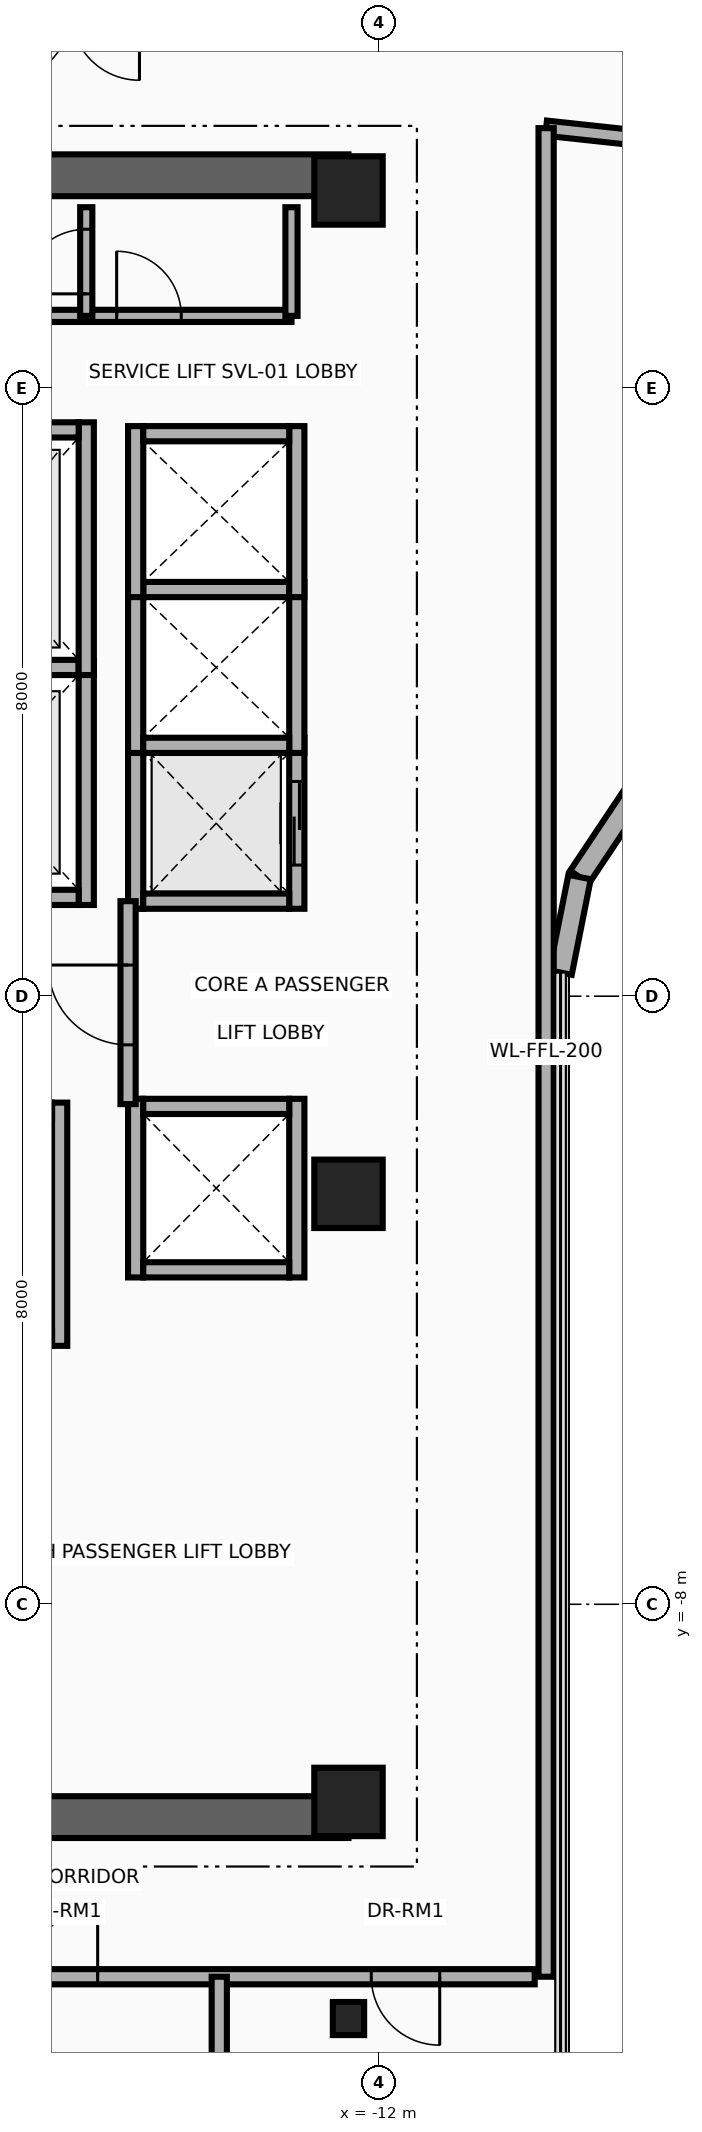
"""IFC4 building model, lengths in metres.
Left out: names, types, materials, properties, quantities, classifications, styles, units other than length and angle.
Written with IfcOpenShell. Run it as: python <this file> out.ifc"""

import sys

from ifc_helpers import new_model, si_unit, direction, frame, frame_2d, origin, origin_2d, place, context, subcontext, project, spatial, rectangle, i_section, extrude, source, transform, mapped, element, fill, save


model = new_model("IFC4")
c1 = context("Model", 3, precision=1e-05, world=origin(), true_north=direction((0.0, 1.0)))
c2 = subcontext(c1, "Body", "Model", "MODEL_VIEW")
j1 = project(units=[si_unit("LENGTHUNIT", "METRE"), si_unit("PLANEANGLEUNIT", "RADIAN")], contexts=[c1])
p1 = place(None, origin())
s1 = spatial("IfcSite", under=j1, at=p1, CompositionType="ELEMENT")
p2 = place(p1, origin())
s2 = spatial("IfcBuilding", under=s1, at=p2, CompositionType="ELEMENT")
p3 = place(p2, frame((0.0, 0.0, 196.3)))
s3 = spatial("IfcBuildingStorey", under=s2, at=p3, CompositionType="ELEMENT", Elevation=196.3)
for number, where, z_axis, x_axis in (
    (1, (-22.65, 10.8, 0.0), (0.0, 0.0, 1.0), (1.0, 0.0, 0.0)),
    (2, (-22.65, -10.8, 0.0), (0.0, 0.0, 1.0), (1.0, 0.0, 0.0)),
):
    element("IfcWall", number, at=place(p3, frame(where, z_axis=z_axis, x_axis=x_axis)), inside=s3, PredefinedType="SHEAR", context=c2, shape_type="SweptSolid", body=[
        extrude(rectangle(XDim=10.25, YDim=0.55, at=frame_2d((5.125, 0.0))), origin(), (0.0, 0.0, 1.0), 4.46),
    ])
m1 = source(origin(), c2, "Body", "SweptSolid", [
    extrude(rectangle(XDim=0.9, YDim=0.9, at=origin_2d()), origin(), (0.0, 0.0, 1.0), 4.7),
])
for number, where, z_axis, x_axis in (
    (3, (-12.4, -10.6, 0.0), (0.0, 0.0, 1.0), (1.0, 0.0, 0.0)),
    (4, (-12.4, -2.6, 0.0), (0.0, 0.0, 1.0), (1.0, 0.0, 0.0)),
    (5, (-12.4, 10.6, 0.0), (0.0, 0.0, 1.0), (1.0, 0.0, 0.0)),
):
    element("IfcColumn", number, at=place(p3, frame(where, z_axis=z_axis, x_axis=x_axis)), inside=s3, PredefinedType="COLUMN", context=c2, shape_type="MappedRepresentation", body=[
        mapped(m1, transform((0.0, 0.0, 0.0), x_axis=(1.0, 0.0, 0.0), y_axis=(0.0, 1.0, 0.0), z_axis=(0.0, 0.0, 1.0), scale=1.0)),
    ])
m2 = source(origin(), c2, "Body", "SweptSolid", [
    extrude(i_section(OverallWidth=0.412, OverallDepth=0.435, WebThickness=0.036, FlangeThickness=0.057, at=origin_2d()), origin(), (0.0, 0.0, 1.0), 4.7),
])
p4 = place(p3, frame((-12.4, -13.45, 0.0), z_axis=(0.0, 0.0, 1.0), x_axis=(1.0, 0.0, 0.0)))
e6 = element("IfcColumn", 6, at=p4, inside=s3, PredefinedType="COLUMN", context=c2, shape_type="MappedRepresentation", body=[
    mapped(m2, transform((0.0, 0.0, 0.0), x_axis=(1.0, 0.0, 0.0), y_axis=(0.0, 1.0, 0.0), z_axis=(0.0, 0.0, 1.0), scale=1.0)),
])
p5 = place(p3, frame((-8.642, 2.642, 0.0), z_axis=(0.0, 0.0, 1.0), x_axis=(-0.555528135371, -0.831497739511, 0.0)))
e7 = element("IfcWall", 7, at=p5, inside=s3, PredefinedType="SOLIDWALL", context=c2, shape_type="SweptSolid", body=[
    extrude(rectangle(XDim=1.292, YDim=0.3, at=frame_2d((0.646, 0.0))), origin(), (0.0, 0.0, 1.0), 4.46),
])
p6 = place(p3, frame((-9.36, 1.567, 0.0), z_axis=(0.0, 0.0, 1.0), x_axis=(-0.195126623715, -0.980778058848, 0.0)))
e8 = element("IfcWall", 8, at=p6, inside=s3, PredefinedType="SOLIDWALL", context=c2, shape_type="SweptSolid", body=[
    extrude(rectangle(XDim=1.281, YDim=0.3, at=frame_2d((0.641, 0.0))), origin(), (0.0, 0.0, 1.0), 4.46),
])
p7 = place(p3, frame((-15.85, 1.2, 0.0), z_axis=(0.0, 0.0, 1.0), x_axis=(0.0, 1.0, 0.0)))
e9 = element("IfcWall", 9, at=p7, inside=s3, PredefinedType="MOVABLE", context=c2, shape_type="SweptSolid", body=[
    extrude(rectangle(XDim=3.225, YDim=0.2, at=frame_2d((1.613, 0.0))), origin(), (0.0, 0.0, 1.0), 4.46),
])
p8 = place(p3, frame((-18.55, 1.3, 0.0), z_axis=(0.0, 0.0, 1.0), x_axis=(1.0, 0.0, 0.0)))
e10 = element("IfcWall", 10, at=p8, inside=s3, PredefinedType="MOVABLE", context=c2, shape_type="SweptSolid", body=[
    extrude(rectangle(XDim=2.6, YDim=0.2, at=frame_2d((1.3, 0.0))), origin(), (0.0, 0.0, 1.0), 4.46),
])
p9 = place(p8, frame((0.7, 0.0, 0.0)))
e11 = element("IfcOpeningElement", 11, at=p9, cuts=e10, PredefinedType="OPENING", context=c2, shape_type="SweptSolid", body=[
    extrude(rectangle(XDim=1.2, YDim=2.1, at=frame_2d((0.6, 1.05))), frame((0.0, 0.115, 0.0), z_axis=(0.0, -1.0, 0.0), x_axis=(1.0, 0.0, 0.0)), (0.0, 0.0, 1.0), 0.23),
])
p10 = place(p3, frame((-18.55, 4.325, 0.0), z_axis=(0.0, 0.0, 1.0), x_axis=(1.0, 0.0, 0.0)))
e12 = element("IfcWall", 12, at=p10, inside=s3, PredefinedType="MOVABLE", context=c2, shape_type="SweptSolid", body=[
    extrude(rectangle(XDim=2.6, YDim=0.2, at=frame_2d((1.3, 0.0))), origin(), (0.0, 0.0, 1.0), 4.46),
])
p11 = place(p3, frame((-16.2, -4.6, 0.0), z_axis=(0.0, 0.0, 1.0), x_axis=(0.0, 1.0, 0.0)))
e13 = element("IfcWall", 13, at=p11, inside=s3, PredefinedType="MOVABLE", context=c2, shape_type="SweptSolid", body=[
    extrude(rectangle(XDim=3.2, YDim=0.2, at=frame_2d((1.6, 0.0))), origin(), (0.0, 0.0, 1.0), 4.46),
])
p12 = place(p3, frame((-15.85, 4.225, 0.0), z_axis=(0.0, 0.0, 1.0), x_axis=(0.0, 1.0, 0.0)))
e14 = element("IfcWall", 14, at=p12, inside=s3, PredefinedType="MOVABLE", context=c2, shape_type="SweptSolid", body=[
    extrude(rectangle(XDim=3.325, YDim=0.2, at=frame_2d((1.663, 0.0))), origin(), (0.0, 0.0, 1.0), 4.46),
])
p13 = place(p3, frame((-18.55, 7.45, 0.0), z_axis=(0.0, 0.0, 1.0), x_axis=(1.0, 0.0, 0.0)))
e15 = element("IfcWall", 15, at=p13, inside=s3, PredefinedType="MOVABLE", context=c2, shape_type="SweptSolid", body=[
    extrude(rectangle(XDim=2.6, YDim=0.2, at=frame_2d((1.3, 0.0))), origin(), (0.0, 0.0, 1.0), 4.46),
])
p14 = place(p13, frame((0.7, 0.0, 0.0)))
e16 = element("IfcOpeningElement", 16, at=p14, cuts=e15, PredefinedType="OPENING", context=c2, shape_type="SweptSolid", body=[
    extrude(rectangle(XDim=1.2, YDim=2.1, at=frame_2d((0.6, 1.05))), frame((0.0, 0.115, 0.0), z_axis=(0.0, -1.0, 0.0), x_axis=(1.0, 0.0, 0.0)), (0.0, 0.0, 1.0), 0.23),
])
p15 = place(p3, frame((-15.2, 1.15, 0.0), z_axis=(0.0, 0.0, 1.0), x_axis=(0.0, 1.0, 0.0)))
e17 = element("IfcWall", 17, at=p15, inside=s3, PredefinedType="MOVABLE", context=c2, shape_type="SweptSolid", body=[
    extrude(rectangle(XDim=2.25, YDim=0.2, at=frame_2d((1.125, 0.0))), origin(), (0.0, 0.0, 1.0), 4.46),
])
p16 = place(p3, frame((-13.08, 1.15, 0.0), z_axis=(0.0, 0.0, 1.0), x_axis=(0.0, 1.0, 0.0)))
e18 = element("IfcWall", 18, at=p16, inside=s3, PredefinedType="MOVABLE", context=c2, shape_type="SweptSolid", body=[
    extrude(rectangle(XDim=2.25, YDim=0.2, at=frame_2d((1.125, 0.0))), origin(), (0.0, 0.0, 1.0), 4.46),
])
p17 = place(p16, frame((0.575, 0.0, 0.0)))
e19 = element("IfcOpeningElement", 19, at=p17, cuts=e18, PredefinedType="OPENING", context=c2, shape_type="SweptSolid", body=[
    extrude(rectangle(XDim=1.1, YDim=2.1, at=frame_2d((0.55, 1.05))), frame((0.0, 0.115, 0.0), z_axis=(0.0, -1.0, 0.0), x_axis=(1.0, 0.0, 0.0)), (0.0, 0.0, 1.0), 0.23),
])
p18 = place(p3, frame((-15.1, 1.25, 0.0), z_axis=(0.0, 0.0, 1.0), x_axis=(1.0, 0.0, 0.0)))
e20 = element("IfcWall", 20, at=p18, inside=s3, PredefinedType="MOVABLE", context=c2, shape_type="SweptSolid", body=[
    extrude(rectangle(XDim=1.92, YDim=0.2, at=frame_2d((0.96, 0.0))), origin(), (0.0, 0.0, 1.0), 4.46),
])
for number, where, z_axis, x_axis in (
    (21, (-15.2, 3.2, 0.0), (0.0, 0.0, 1.0), (0.0, 1.0, 0.0)),
    (22, (-13.08, 3.2, 0.0), (0.0, 0.0, 1.0), (0.0, 1.0, 0.0)),
):
    element("IfcWall", number, at=place(p3, frame(where, z_axis=z_axis, x_axis=x_axis)), inside=s3, PredefinedType="MOVABLE", context=c2, shape_type="SweptSolid", body=[
        extrude(rectangle(XDim=2.25, YDim=0.2, at=frame_2d((1.125, 0.0))), origin(), (0.0, 0.0, 1.0), 4.46),
    ])
for number, where, z_axis, x_axis in (
    (23, (-15.1, 3.3, 0.0), (0.0, 0.0, 1.0), (1.0, 0.0, 0.0)),
    (24, (-15.1, 5.35, 0.0), (0.0, 0.0, 1.0), (1.0, 0.0, 0.0)),
):
    element("IfcWall", number, at=place(p3, frame(where, z_axis=z_axis, x_axis=x_axis)), inside=s3, PredefinedType="MOVABLE", context=c2, shape_type="SweptSolid", body=[
        extrude(rectangle(XDim=1.92, YDim=0.2, at=frame_2d((0.96, 0.0))), origin(), (0.0, 0.0, 1.0), 4.46),
    ])
for number, where, z_axis, x_axis in (
    (25, (-15.2, 5.25, 0.0), (0.0, 0.0, 1.0), (0.0, 1.0, 0.0)),
    (26, (-13.08, 5.25, 0.0), (0.0, 0.0, 1.0), (0.0, 1.0, 0.0)),
):
    element("IfcWall", number, at=place(p3, frame(where, z_axis=z_axis, x_axis=x_axis)), inside=s3, PredefinedType="MOVABLE", context=c2, shape_type="SweptSolid", body=[
        extrude(rectangle(XDim=2.25, YDim=0.2, at=frame_2d((1.125, 0.0))), origin(), (0.0, 0.0, 1.0), 4.46),
    ])
p19 = place(p3, frame((-15.1, 7.4, 0.0), z_axis=(0.0, 0.0, 1.0), x_axis=(1.0, 0.0, 0.0)))
e27 = element("IfcWall", 27, at=p19, inside=s3, PredefinedType="MOVABLE", context=c2, shape_type="SweptSolid", body=[
    extrude(rectangle(XDim=1.92, YDim=0.2, at=frame_2d((0.96, 0.0))), origin(), (0.0, 0.0, 1.0), 4.46),
])
for number, where, z_axis, x_axis in (
    (28, (-15.2, -3.7, 0.0), (0.0, 0.0, 1.0), (0.0, 1.0, 0.0)),
    (29, (-13.08, -3.7, 0.0), (0.0, 0.0, 1.0), (0.0, 1.0, 0.0)),
):
    element("IfcWall", number, at=place(p3, frame(where, z_axis=z_axis, x_axis=x_axis)), inside=s3, PredefinedType="MOVABLE", context=c2, shape_type="SweptSolid", body=[
        extrude(rectangle(XDim=2.35, YDim=0.2, at=frame_2d((1.175, 0.0))), origin(), (0.0, 0.0, 1.0), 4.46),
    ])
for number, where, z_axis, x_axis in (
    (30, (-15.1, -3.6, 0.0), (0.0, 0.0, 1.0), (1.0, 0.0, 0.0)),
    (31, (-15.1, -1.45, 0.0), (0.0, 0.0, 1.0), (1.0, 0.0, 0.0)),
):
    element("IfcWall", number, at=place(p3, frame(where, z_axis=z_axis, x_axis=x_axis)), inside=s3, PredefinedType="MOVABLE", context=c2, shape_type="SweptSolid", body=[
        extrude(rectangle(XDim=1.92, YDim=0.2, at=frame_2d((0.96, 0.0))), origin(), (0.0, 0.0, 1.0), 4.46),
    ])
p20 = place(p3, frame((-15.3, -1.42, 0.0), z_axis=(0.0, 0.0, 1.0), x_axis=(0.0, 1.0, 0.0)))
e32 = element("IfcWall", 32, at=p20, inside=s3, PredefinedType="PARTITIONING", context=c2, shape_type="SweptSolid", body=[
    extrude(rectangle(XDim=2.67, YDim=0.2, at=frame_2d((1.335, 0.0))), origin(), (0.0, 0.0, 1.0), 4.46),
])
p21 = place(p20, frame((0.78, 0.0, 0.0)))
e33 = element("IfcOpeningElement", 33, at=p21, cuts=e32, PredefinedType="OPENING", context=c2, shape_type="SweptSolid", body=[
    extrude(rectangle(XDim=1.05, YDim=2.15, at=frame_2d((0.525, 1.075))), frame((0.0, 0.115, 0.0), z_axis=(0.0, -1.0, 0.0), x_axis=(1.0, 0.0, 0.0)), (0.0, 0.0, 1.0), 0.23),
])
p22 = place(p3, frame((-18.65, 8.95, 0.0), z_axis=(0.0, 0.0, 1.0), x_axis=(1.0, 0.0, 0.0)))
e34 = element("IfcWall", 34, at=p22, inside=s3, PredefinedType="PARTITIONING", context=c2, shape_type="SweptSolid", body=[
    extrude(rectangle(XDim=5.5, YDim=0.16, at=frame_2d((2.75, 0.0))), origin(), (0.0, 0.0, 1.0), 4.46),
])
p23 = place(p22, frame((0.3, 0.0, 0.0)))
e35 = element("IfcOpeningElement", 35, at=p23, cuts=e34, PredefinedType="OPENING", context=c2, shape_type="SweptSolid", body=[
    extrude(rectangle(XDim=0.85, YDim=2.05, at=frame_2d((0.425, 1.025))), frame((0.0, 0.095, 0.0), z_axis=(0.0, -1.0, 0.0), x_axis=(1.0, 0.0, 0.0)), (0.0, 0.0, 1.0), 0.19),
])
p24 = place(p22, frame((3.2, 0.0, 0.0)))
e36 = element("IfcOpeningElement", 36, at=p24, cuts=e34, PredefinedType="OPENING", context=c2, shape_type="SweptSolid", body=[
    extrude(rectangle(XDim=0.85, YDim=2.05, at=frame_2d((0.425, 1.025))), frame((0.0, 0.095, 0.0), z_axis=(0.0, -1.0, 0.0), x_axis=(1.0, 0.0, 0.0)), (0.0, 0.0, 1.0), 0.19),
])
p25 = place(p3, frame((-13.15, 8.95, 0.0), z_axis=(0.0, 0.0, 1.0), x_axis=(0.0, 1.0, 0.0)))
e37 = element("IfcWall", 37, at=p25, inside=s3, PredefinedType="PARTITIONING", context=c2, shape_type="SweptSolid", body=[
    extrude(rectangle(XDim=1.43, YDim=0.16, at=frame_2d((0.715, 0.0))), origin(), (0.0, 0.0, 1.0), 4.46),
])
p26 = place(p3, frame((-15.85, 8.95, 0.0), z_axis=(0.0, 0.0, 1.0), x_axis=(0.0, 1.0, 0.0)))
e38 = element("IfcWall", 38, at=p26, inside=s3, PredefinedType="PARTITIONING", context=c2, shape_type="SweptSolid", body=[
    extrude(rectangle(XDim=1.43, YDim=0.16, at=frame_2d((0.715, 0.0))), origin(), (0.0, 0.0, 1.0), 4.46),
])
p27 = place(p26, frame((0.29, 0.0, 0.0)))
e39 = element("IfcOpeningElement", 39, at=p27, cuts=e38, PredefinedType="OPENING", context=c2, shape_type="SweptSolid", body=[
    extrude(rectangle(XDim=0.85, YDim=2.05, at=frame_2d((0.425, 1.025))), frame((0.0, 0.095, 0.0), z_axis=(0.0, -1.0, 0.0), x_axis=(1.0, 0.0, 0.0)), (0.0, 0.0, 1.0), 0.19),
])
p28 = place(p3, frame((-22.0, -12.9, 0.0), z_axis=(0.0, 0.0, 1.0), x_axis=(1.0, 0.0, 0.0)))
e40 = element("IfcWall", 40, at=p28, inside=s3, PredefinedType="PARTITIONING", context=c2, shape_type="SweptSolid", body=[
    extrude(rectangle(XDim=12.05, YDim=0.2, at=frame_2d((6.025, 0.0))), origin(), (0.0, 0.0, 1.0), 3.834),
])
p29 = place(p28, frame((1.4, 0.0, 0.0)))
e41 = element("IfcOpeningElement", 41, at=p29, cuts=e40, PredefinedType="OPENING", context=c2, shape_type="SweptSolid", body=[
    extrude(rectangle(XDim=0.9, YDim=2.1, at=frame_2d((0.45, 1.05))), frame((0.0, 0.115, 0.0), z_axis=(0.0, -1.0, 0.0), x_axis=(1.0, 0.0, 0.0)), (0.0, 0.0, 1.0), 0.23),
])
p30 = place(p28, frame((5.4, 0.0, 0.0)))
e42 = element("IfcOpeningElement", 42, at=p30, cuts=e40, PredefinedType="OPENING", context=c2, shape_type="SweptSolid", body=[
    extrude(rectangle(XDim=0.9, YDim=2.1, at=frame_2d((0.45, 1.05))), frame((0.0, 0.115, 0.0), z_axis=(0.0, -1.0, 0.0), x_axis=(1.0, 0.0, 0.0)), (0.0, 0.0, 1.0), 0.23),
])
p31 = place(p28, frame((9.9, 0.0, 0.0)))
e43 = element("IfcOpeningElement", 43, at=p31, cuts=e40, PredefinedType="OPENING", context=c2, shape_type="SweptSolid", body=[
    extrude(rectangle(XDim=0.9, YDim=2.1, at=frame_2d((0.45, 1.05))), frame((0.0, 0.115, 0.0), z_axis=(0.0, -1.0, 0.0), x_axis=(1.0, 0.0, 0.0)), (0.0, 0.0, 1.0), 0.23),
])
p32 = place(p3, frame((-14.1, -17.3, 0.0), z_axis=(0.0, 0.0, 1.0), x_axis=(0.0, 1.0, 0.0)))
e44 = element("IfcWall", 44, at=p32, inside=s3, PredefinedType="PARTITIONING", context=c2, shape_type="SweptSolid", body=[
    extrude(rectangle(XDim=4.4, YDim=0.2, at=frame_2d((2.2, 0.0))), origin(), (0.0, 0.0, 1.0), 3.906),
])
p33 = place(p3, frame((-9.8, 11.42, 0.0), z_axis=(0.0, 0.0, 1.0), x_axis=(0.994224725298, -0.107318197923, 0.0)))
e45 = element("IfcWall", 45, at=p33, inside=s3, PredefinedType="PARTITIONING", context=c2, shape_type="SweptSolid", body=[
    extrude(rectangle(XDim=10.123, YDim=0.2, at=frame_2d((5.062, 0.0))), origin(), (0.0, 0.0, 1.0), 3.906),
])
p34 = place(p3, frame((-9.8, -12.9, 0.0), z_axis=(0.0, 0.0, 1.0), x_axis=(0.0, 1.0, 0.0)))
e46 = element("IfcWall", 46, at=p34, inside=s3, PredefinedType="PARTITIONING", context=c2, shape_type="SweptSolid", body=[
    extrude(rectangle(XDim=24.32, YDim=0.2, at=frame_2d((12.16, 0.0))), origin(), (0.0, 0.0, 1.0), 3.744),
])
p35 = place(p17, origin())
e47 = element("IfcDoor", 47, at=p35, inside=s3, OperationType="DOUBLE_DOOR_SLIDING", PredefinedType="DOOR", context=c2, shape_type="SweptSolid", body=[
    extrude(rectangle(XDim=1.1, YDim=2.1, at=frame_2d((0.55, 1.05))), frame((0.0, 0.025, 0.0), z_axis=(0.0, -1.0, 0.0), x_axis=(1.0, 0.0, 0.0)), (0.0, 0.0, 1.0), 0.05),
])
fill(e19, e47)
p36 = place(p21, origin())
e48 = element("IfcDoor", 48, at=p36, inside=s3, OperationType="SINGLE_SWING_RIGHT", PredefinedType="DOOR", context=c2, shape_type="SweptSolid", body=[
    extrude(rectangle(XDim=1.05, YDim=2.15, at=frame_2d((0.525, 1.075))), frame((0.0, 0.025, 0.0), z_axis=(0.0, -1.0, 0.0), x_axis=(1.0, 0.0, 0.0)), (0.0, 0.0, 1.0), 0.05),
])
fill(e33, e48)
p37 = place(p24, origin())
e49 = element("IfcDoor", 49, at=p37, inside=s3, OperationType="SINGLE_SWING_RIGHT", PredefinedType="DOOR", context=c2, shape_type="SweptSolid", body=[
    extrude(rectangle(XDim=0.85, YDim=2.05, at=frame_2d((0.425, 1.025))), frame((0.0, 0.025, 0.0), z_axis=(0.0, -1.0, 0.0), x_axis=(1.0, 0.0, 0.0)), (0.0, 0.0, 1.0), 0.05),
])
fill(e36, e49)
p38 = place(p27, origin())
e50 = element("IfcDoor", 50, at=p38, inside=s3, OperationType="SINGLE_SWING_LEFT", PredefinedType="DOOR", context=c2, shape_type="SweptSolid", body=[
    extrude(rectangle(XDim=0.85, YDim=2.05, at=frame_2d((0.425, 1.025))), frame((0.0, 0.025, 0.0), z_axis=(0.0, -1.0, 0.0), x_axis=(1.0, 0.0, 0.0)), (0.0, 0.0, 1.0), 0.05),
])
fill(e39, e50)
p39 = place(p30, origin())
e51 = element("IfcDoor", 51, at=p39, inside=s3, OperationType="SINGLE_SWING_RIGHT", PredefinedType="DOOR", context=c2, shape_type="SweptSolid", body=[
    extrude(rectangle(XDim=0.9, YDim=2.1, at=frame_2d((0.45, 1.05))), frame((0.0, 0.025, 0.0), z_axis=(0.0, -1.0, 0.0), x_axis=(1.0, 0.0, 0.0)), (0.0, 0.0, 1.0), 0.05),
])
fill(e42, e51)
p40 = place(p31, frame((0.9, 0.0, 0.0), z_axis=(0.0, 0.0, 1.0), x_axis=(-1.0, 0.0, 0.0)))
e52 = element("IfcDoor", 52, at=p40, inside=s3, OperationType="SINGLE_SWING_LEFT", PredefinedType="DOOR", context=c2, shape_type="SweptSolid", body=[
    extrude(rectangle(XDim=0.9, YDim=2.1, at=frame_2d((0.45, 1.05))), frame((0.0, 0.025, 0.0), z_axis=(0.0, -1.0, 0.0), x_axis=(1.0, 0.0, 0.0)), (0.0, 0.0, 1.0), 0.05),
])
fill(e43, e52)
save(model, sys.argv[1])
